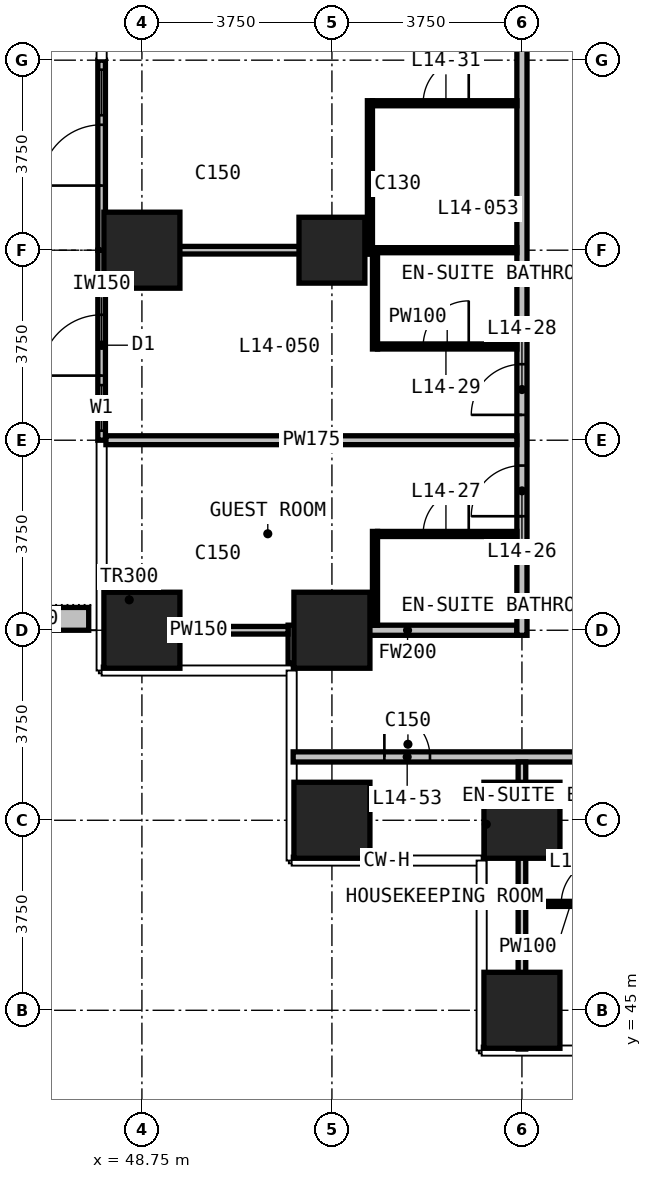
"""IFC4 building model, lengths in metres.
Left out: names, types, materials, properties, quantities, classifications, styles, units other than length and angle.
Written with IfcOpenShell. Run it as: python <this file> out.ifc"""

import sys

from ifc_helpers import new_model, si_unit, direction, frame, frame_2d, origin, origin_2d, place, context, subcontext, project, spatial, rectangle, extrude, element, fill, save


model = new_model("IFC4")
c1 = context("Model", 3, precision=1e-05, world=origin(), true_north=direction((0.0, 1.0)))
c2 = subcontext(c1, "Body", "Model", "MODEL_VIEW")
j1 = project(units=[si_unit("LENGTHUNIT", "METRE"), si_unit("PLANEANGLEUNIT", "RADIAN")], contexts=[c1])
p1 = place(None, origin())
s1 = spatial("IfcSite", under=j1, at=p1, CompositionType="ELEMENT")
p2 = place(p1, origin())
s2 = spatial("IfcBuilding", under=s1, at=p2, CompositionType="ELEMENT")
p3 = place(p2, frame((0.0, 0.0, 65.9)))
s3 = spatial("IfcBuildingStorey", under=s2, at=p3, CompositionType="ELEMENT", Elevation=65.9)
for number, where, z_axis, x_axis in (
    (1, (48.75, 52.5, 0.0), (0.0, 0.0, 1.0), (1.0, 0.0, 0.0)),
    (2, (48.75, 60.0, 0.0), (0.0, 0.0, 1.0), (1.0, 0.0, 0.0)),
    (3, (52.5, 48.75, 0.0), (0.0, 0.0, 1.0), (1.0, 0.0, 0.0)),
    (4, (52.5, 52.5, 0.0), (0.0, 0.0, 1.0), (1.0, 0.0, 0.0)),
):
    element("IfcColumn", number, at=place(p3, frame(where, z_axis=z_axis, x_axis=x_axis)), inside=s3, PredefinedType="COLUMN", context=c2, shape_type="SweptSolid", body=[
        extrude(rectangle(XDim=1.5, YDim=1.5, at=origin_2d()), origin(), (0.0, 0.0, 1.0), 3.3),
    ])
p4 = place(p3, frame((52.5, 60.0, 0.0), z_axis=(0.0, 0.0, 1.0), x_axis=(1.0, 0.0, 0.0)))
e5 = element("IfcColumn", 5, at=p4, inside=s3, PredefinedType="COLUMN", context=c2, shape_type="SweptSolid", body=[
    extrude(rectangle(XDim=1.3, YDim=1.3, at=origin_2d()), origin(), (0.0, 0.0, 1.0), 3.3),
])
for number, where, z_axis, x_axis in (
    (6, (56.25, 45.0, 0.0), (0.0, 0.0, 1.0), (1.0, 0.0, 0.0)),
    (7, (56.25, 48.75, 0.0), (0.0, 0.0, 1.0), (1.0, 0.0, 0.0)),
):
    element("IfcColumn", number, at=place(p3, frame(where, z_axis=z_axis, x_axis=x_axis)), inside=s3, PredefinedType="COLUMN", context=c2, shape_type="SweptSolid", body=[
        extrude(rectangle(XDim=1.5, YDim=1.5, at=origin_2d()), origin(), (0.0, 0.0, 1.0), 3.3),
    ])
p5 = place(p3, frame((47.955, 56.25, 0.0), z_axis=(0.0, 0.0, 1.0), x_axis=(0.0, 1.0, 0.0)))
e8 = element("IfcWall", 8, at=p5, inside=s3, PredefinedType="SOLIDWALL", context=c2, shape_type="SweptSolid", body=[
    extrude(rectangle(XDim=3.75, YDim=0.15, at=frame_2d((1.875, 0.0))), origin(), (0.0, 0.0, 1.0), 3.0),
])
p6 = place(p5, frame((0.188, 0.0, 0.1)))
e9 = element("IfcOpeningElement", 9, at=p6, cuts=e8, PredefinedType="OPENING", context=c2, shape_type="SweptSolid", body=[
    extrude(rectangle(XDim=0.9, YDim=2.4, at=frame_2d((0.45, 1.2))), frame((0.0, 0.085, 0.0), z_axis=(0.0, -1.0, 0.0), x_axis=(1.0, 0.0, 0.0)), (0.0, 0.0, 1.0), 0.17),
])
p7 = place(p5, frame((1.275, 0.0, 0.0)))
e10 = element("IfcOpeningElement", 10, at=p7, cuts=e8, PredefinedType="OPENING", context=c2, shape_type="SweptSolid", body=[
    extrude(rectangle(XDim=1.2, YDim=2.4, at=frame_2d((0.6, 1.2))), frame((0.0, 0.085, 0.0), z_axis=(0.0, -1.0, 0.0), x_axis=(1.0, 0.0, 0.0)), (0.0, 0.0, 1.0), 0.17),
])
p8 = place(p3, frame((47.955, 60.0, 0.0), z_axis=(0.0, 0.0, 1.0), x_axis=(0.0, 1.0, 0.0)))
e11 = element("IfcWall", 11, at=p8, inside=s3, PredefinedType="SOLIDWALL", context=c2, shape_type="SweptSolid", body=[
    extrude(rectangle(XDim=3.75, YDim=0.15, at=frame_2d((1.875, 0.0))), origin(), (0.0, 0.0, 1.0), 3.0),
])
p9 = place(p8, frame((1.275, 0.0, 0.0)))
e12 = element("IfcOpeningElement", 12, at=p9, cuts=e11, PredefinedType="OPENING", context=c2, shape_type="SweptSolid", body=[
    extrude(rectangle(XDim=1.2, YDim=2.4, at=frame_2d((0.6, 1.2))), frame((0.0, 0.085, 0.0), z_axis=(0.0, -1.0, 0.0), x_axis=(1.0, 0.0, 0.0)), (0.0, 0.0, 1.0), 0.17),
])
p10 = place(p8, frame((2.663, 0.0, 0.1)))
e13 = element("IfcOpeningElement", 13, at=p10, cuts=e11, PredefinedType="OPENING", context=c2, shape_type="SweptSolid", body=[
    extrude(rectangle(XDim=0.9, YDim=2.4, at=frame_2d((0.45, 1.2))), frame((0.0, 0.085, 0.0), z_axis=(0.0, -1.0, 0.0), x_axis=(1.0, 0.0, 0.0)), (0.0, 0.0, 1.0), 0.17),
])
p11 = place(p3, frame((47.7, 52.725, 0.0), z_axis=(0.0, 0.0, 1.0), x_axis=(-1.0, 0.0, 0.0)))
e14 = element("IfcWall", 14, at=p11, inside=s3, PredefinedType="USERDEFINED", context=c2, shape_type="SweptSolid", body=[
    extrude(rectangle(XDim=2.35, YDim=0.45, at=frame_2d((1.175, 0.0))), origin(), (0.0, 0.0, 1.0), 1.1),
])
p12 = place(p3, frame((51.735, 50.0, 0.0), z_axis=(0.0, 0.0, 1.0), x_axis=(1.0, 0.0, 0.0)))
e15 = element("IfcWall", 15, at=p12, inside=s3, PredefinedType="PARTITIONING", context=c2, shape_type="SweptSolid", body=[
    extrude(rectangle(XDim=46.53, YDim=0.2, at=frame_2d((23.265, 0.0))), origin(), (0.0, 0.0, 1.0), 3.0),
])
p13 = place(p12, frame((6.765, 0.0, 0.0)))
e16 = element("IfcOpeningElement", 16, at=p13, cuts=e15, PredefinedType="OPENING", context=c2, shape_type="SweptSolid", body=[
    extrude(rectangle(XDim=1.0, YDim=2.2, at=frame_2d((0.5, 1.1))), frame((0.0, 0.11, 0.0), z_axis=(0.0, -1.0, 0.0), x_axis=(1.0, 0.0, 0.0)), (0.0, 0.0, 1.0), 0.22),
])
p14 = place(p12, frame((10.515, 0.0, 0.0)))
e17 = element("IfcOpeningElement", 17, at=p14, cuts=e15, PredefinedType="OPENING", context=c2, shape_type="SweptSolid", body=[
    extrude(rectangle(XDim=1.0, YDim=2.2, at=frame_2d((0.5, 1.1))), frame((0.0, 0.11, 0.0), z_axis=(0.0, -1.0, 0.0), x_axis=(1.0, 0.0, 0.0)), (0.0, 0.0, 1.0), 0.22),
])
p15 = place(p12, frame((12.515, 0.0, 0.0)))
e18 = element("IfcOpeningElement", 18, at=p15, cuts=e15, PredefinedType="OPENING", context=c2, shape_type="SweptSolid", body=[
    extrude(rectangle(XDim=1.0, YDim=2.2, at=frame_2d((0.5, 1.1))), frame((0.0, 0.11, 0.0), z_axis=(0.0, -1.0, 0.0), x_axis=(1.0, 0.0, 0.0)), (0.0, 0.0, 1.0), 0.22),
])
p16 = place(p12, frame((18.015, 0.0, 0.0)))
e19 = element("IfcOpeningElement", 19, at=p16, cuts=e15, PredefinedType="OPENING", context=c2, shape_type="SweptSolid", body=[
    extrude(rectangle(XDim=1.0, YDim=2.2, at=frame_2d((0.5, 1.1))), frame((0.0, 0.11, 0.0), z_axis=(0.0, -1.0, 0.0), x_axis=(1.0, 0.0, 0.0)), (0.0, 0.0, 1.0), 0.22),
])
p17 = place(p12, frame((20.015, 0.0, 0.0)))
e20 = element("IfcOpeningElement", 20, at=p17, cuts=e15, PredefinedType="OPENING", context=c2, shape_type="SweptSolid", body=[
    extrude(rectangle(XDim=1.0, YDim=2.2, at=frame_2d((0.5, 1.1))), frame((0.0, 0.11, 0.0), z_axis=(0.0, -1.0, 0.0), x_axis=(1.0, 0.0, 0.0)), (0.0, 0.0, 1.0), 0.22),
])
p18 = place(p12, frame((25.515, 0.0, 0.0)))
e21 = element("IfcOpeningElement", 21, at=p18, cuts=e15, PredefinedType="OPENING", context=c2, shape_type="SweptSolid", body=[
    extrude(rectangle(XDim=1.0, YDim=2.2, at=frame_2d((0.5, 1.1))), frame((0.0, 0.11, 0.0), z_axis=(0.0, -1.0, 0.0), x_axis=(1.0, 0.0, 0.0)), (0.0, 0.0, 1.0), 0.22),
])
p19 = place(p12, frame((27.515, 0.0, 0.0)))
e22 = element("IfcOpeningElement", 22, at=p19, cuts=e15, PredefinedType="OPENING", context=c2, shape_type="SweptSolid", body=[
    extrude(rectangle(XDim=1.0, YDim=2.2, at=frame_2d((0.5, 1.1))), frame((0.0, 0.11, 0.0), z_axis=(0.0, -1.0, 0.0), x_axis=(1.0, 0.0, 0.0)), (0.0, 0.0, 1.0), 0.22),
])
p20 = place(p12, frame((33.015, 0.0, 0.0)))
e23 = element("IfcOpeningElement", 23, at=p20, cuts=e15, PredefinedType="OPENING", context=c2, shape_type="SweptSolid", body=[
    extrude(rectangle(XDim=1.0, YDim=2.2, at=frame_2d((0.5, 1.1))), frame((0.0, 0.11, 0.0), z_axis=(0.0, -1.0, 0.0), x_axis=(1.0, 0.0, 0.0)), (0.0, 0.0, 1.0), 0.22),
])
p21 = place(p12, frame((35.015, 0.0, 0.0)))
e24 = element("IfcOpeningElement", 24, at=p21, cuts=e15, PredefinedType="OPENING", context=c2, shape_type="SweptSolid", body=[
    extrude(rectangle(XDim=1.0, YDim=2.2, at=frame_2d((0.5, 1.1))), frame((0.0, 0.11, 0.0), z_axis=(0.0, -1.0, 0.0), x_axis=(1.0, 0.0, 0.0)), (0.0, 0.0, 1.0), 0.22),
])
p22 = place(p12, frame((38.765, 0.0, 0.0)))
e25 = element("IfcOpeningElement", 25, at=p22, cuts=e15, PredefinedType="OPENING", context=c2, shape_type="SweptSolid", body=[
    extrude(rectangle(XDim=1.0, YDim=2.2, at=frame_2d((0.5, 1.1))), frame((0.0, 0.11, 0.0), z_axis=(0.0, -1.0, 0.0), x_axis=(1.0, 0.0, 0.0)), (0.0, 0.0, 1.0), 0.22),
])
p23 = place(p12, frame((1.8, 0.0, 0.0)))
e26 = element("IfcOpeningElement", 26, at=p23, cuts=e15, PredefinedType="OPENING", context=c2, shape_type="SweptSolid", body=[
    extrude(rectangle(XDim=0.9, YDim=2.2, at=frame_2d((0.45, 1.1))), frame((0.0, 0.11, 0.0), z_axis=(0.0, -1.0, 0.0), x_axis=(1.0, 0.0, 0.0)), (0.0, 0.0, 1.0), 0.22),
])
p24 = place(p12, frame((43.815, 0.0, 0.0)))
e27 = element("IfcOpeningElement", 27, at=p24, cuts=e15, PredefinedType="OPENING", context=c2, shape_type="SweptSolid", body=[
    extrude(rectangle(XDim=0.9, YDim=2.2, at=frame_2d((0.45, 1.1))), frame((0.0, 0.11, 0.0), z_axis=(0.0, -1.0, 0.0), x_axis=(1.0, 0.0, 0.0)), (0.0, 0.0, 1.0), 0.22),
])
p25 = place(p3, frame((51.835, 52.5, 0.0), z_axis=(0.0, 0.0, 1.0), x_axis=(1.0, 0.0, 0.0)))
e28 = element("IfcWall", 28, at=p25, inside=s3, PredefinedType="PARTITIONING", context=c2, shape_type="SweptSolid", body=[
    extrude(rectangle(XDim=4.315, YDim=0.2, at=frame_2d((2.157, 0.0))), origin(), (0.0, 0.0, 1.0), 3.0),
])
p26 = place(p3, frame((51.735, 51.855, 0.0), z_axis=(0.0, 0.0, 1.0), x_axis=(0.0, 1.0, 0.0)))
e29 = element("IfcWall", 29, at=p26, inside=s3, PredefinedType="PARTITIONING", context=c2, shape_type="SweptSolid", body=[
    extrude(rectangle(XDim=0.745, YDim=0.2, at=frame_2d((0.373, 0.0))), origin(), (0.0, 0.0, 1.0), 3.0),
])
p27 = place(p3, frame((56.25, 52.4, 0.0), z_axis=(0.0, 0.0, 1.0), x_axis=(0.0, 1.0, 0.0)))
e30 = element("IfcWall", 30, at=p27, inside=s3, PredefinedType="PARTITIONING", context=c2, shape_type="SweptSolid", body=[
    extrude(rectangle(XDim=38.31, YDim=0.2, at=frame_2d((19.155, 0.0))), origin(), (0.0, 0.0, 1.0), 3.0),
])
p28 = place(p27, frame((2.35, 0.0, 0.0)))
e31 = element("IfcOpeningElement", 31, at=p28, cuts=e30, PredefinedType="OPENING", context=c2, shape_type="SweptSolid", body=[
    extrude(rectangle(XDim=1.0, YDim=2.2, at=frame_2d((0.5, 1.1))), frame((0.0, 0.11, 0.0), z_axis=(0.0, -1.0, 0.0), x_axis=(1.0, 0.0, 0.0)), (0.0, 0.0, 1.0), 0.22),
])
p29 = place(p27, frame((4.35, 0.0, 0.0)))
e32 = element("IfcOpeningElement", 32, at=p29, cuts=e30, PredefinedType="OPENING", context=c2, shape_type="SweptSolid", body=[
    extrude(rectangle(XDim=1.0, YDim=2.2, at=frame_2d((0.5, 1.1))), frame((0.0, 0.11, 0.0), z_axis=(0.0, -1.0, 0.0), x_axis=(1.0, 0.0, 0.0)), (0.0, 0.0, 1.0), 0.22),
])
p30 = place(p27, frame((13.0, 0.0, 0.0)))
e33 = element("IfcOpeningElement", 33, at=p30, cuts=e30, PredefinedType="OPENING", context=c2, shape_type="SweptSolid", body=[
    extrude(rectangle(XDim=1.0, YDim=2.2, at=frame_2d((0.5, 1.1))), frame((0.0, 0.11, 0.0), z_axis=(0.0, -1.0, 0.0), x_axis=(1.0, 0.0, 0.0)), (0.0, 0.0, 1.0), 0.22),
])
p31 = place(p27, frame((15.6, 0.0, 0.0)))
e34 = element("IfcOpeningElement", 34, at=p31, cuts=e30, PredefinedType="OPENING", context=c2, shape_type="SweptSolid", body=[
    extrude(rectangle(XDim=1.0, YDim=2.2, at=frame_2d((0.5, 1.1))), frame((0.0, 0.11, 0.0), z_axis=(0.0, -1.0, 0.0), x_axis=(1.0, 0.0, 0.0)), (0.0, 0.0, 1.0), 0.22),
])
p32 = place(p27, frame((21.1, 0.0, 0.0)))
e35 = element("IfcOpeningElement", 35, at=p32, cuts=e30, PredefinedType="OPENING", context=c2, shape_type="SweptSolid", body=[
    extrude(rectangle(XDim=1.0, YDim=2.2, at=frame_2d((0.5, 1.1))), frame((0.0, 0.11, 0.0), z_axis=(0.0, -1.0, 0.0), x_axis=(1.0, 0.0, 0.0)), (0.0, 0.0, 1.0), 0.22),
])
p33 = place(p27, frame((23.7, 0.0, 0.0)))
e36 = element("IfcOpeningElement", 36, at=p33, cuts=e30, PredefinedType="OPENING", context=c2, shape_type="SweptSolid", body=[
    extrude(rectangle(XDim=1.0, YDim=2.2, at=frame_2d((0.5, 1.1))), frame((0.0, 0.11, 0.0), z_axis=(0.0, -1.0, 0.0), x_axis=(1.0, 0.0, 0.0)), (0.0, 0.0, 1.0), 0.22),
])
p34 = place(p27, frame((31.55, 0.0, 0.0)))
e37 = element("IfcOpeningElement", 37, at=p34, cuts=e30, PredefinedType="OPENING", context=c2, shape_type="SweptSolid", body=[
    extrude(rectangle(XDim=0.9, YDim=2.2, at=frame_2d((0.45, 1.1))), frame((0.0, 0.11, 0.0), z_axis=(0.0, -1.0, 0.0), x_axis=(1.0, 0.0, 0.0)), (0.0, 0.0, 1.0), 0.22),
])
p35 = place(p27, frame((35.65, 0.0, 0.0)))
e38 = element("IfcOpeningElement", 38, at=p35, cuts=e30, PredefinedType="OPENING", context=c2, shape_type="SweptSolid", body=[
    extrude(rectangle(XDim=0.9, YDim=2.2, at=frame_2d((0.45, 1.1))), frame((0.0, 0.11, 0.0), z_axis=(0.0, -1.0, 0.0), x_axis=(1.0, 0.0, 0.0)), (0.0, 0.0, 1.0), 0.22),
])
p36 = place(p3, frame((48.04, 56.25, 0.0), z_axis=(0.0, 0.0, 1.0), x_axis=(1.0, 0.0, 0.0)))
e39 = element("IfcWall", 39, at=p36, inside=s3, PredefinedType="PARTITIONING", context=c2, shape_type="SweptSolid", body=[
    extrude(rectangle(XDim=8.11, YDim=0.175, at=frame_2d((4.055, 0.0))), origin(), (0.0, 0.0, 1.0), 3.0),
])
p37 = place(p3, frame((48.105, 52.5, 0.0), z_axis=(0.0, 0.0, 1.0), x_axis=(1.0, 0.0, 0.0)))
e40 = element("IfcWall", 40, at=p37, inside=s3, PredefinedType="PARTITIONING", context=c2, shape_type="SweptSolid", body=[
    extrude(rectangle(XDim=3.53, YDim=0.15, at=frame_2d((1.765, 0.0))), origin(), (0.0, 0.0, 1.0), 3.0),
])
p38 = place(p3, frame((48.04, 60.0, 0.0), z_axis=(0.0, 0.0, 1.0), x_axis=(1.0, 0.0, 0.0)))
e41 = element("IfcWall", 41, at=p38, inside=s3, PredefinedType="PARTITIONING", context=c2, shape_type="SweptSolid", body=[
    extrude(rectangle(XDim=5.16, YDim=0.15, at=frame_2d((2.58, 0.0))), origin(), (0.0, 0.0, 1.0), 3.0),
])
p39 = place(p3, frame((56.25, 44.235, 0.0), z_axis=(0.0, 0.0, 1.0), x_axis=(0.0, 1.0, 0.0)))
e42 = element("IfcWall", 42, at=p39, inside=s3, PredefinedType="PARTITIONING", context=c2, shape_type="SweptSolid", body=[
    extrude(rectangle(XDim=5.665, YDim=0.15, at=frame_2d((2.833, 0.0))), origin(), (0.0, 0.0, 1.0), 3.0),
])
p40 = place(p3, frame((56.325, 47.1, 0.0), z_axis=(0.0, 0.0, 1.0), x_axis=(1.0, 0.0, 0.0)))
e43 = element("IfcWall", 43, at=p40, inside=s3, PredefinedType="PARTITIONING", context=c2, shape_type="SweptSolid", body=[
    extrude(rectangle(XDim=1.775, YDim=0.1, at=frame_2d((0.888, 0.0))), origin(), (0.0, 0.0, 1.0), 3.0),
])
p41 = place(p40, frame((0.7, 0.0, 0.0)))
e44 = element("IfcOpeningElement", 44, at=p41, cuts=e43, PredefinedType="OPENING", context=c2, shape_type="SweptSolid", body=[
    extrude(rectangle(XDim=0.9, YDim=2.2, at=frame_2d((0.45, 1.1))), frame((0.0, 0.06, 0.0), z_axis=(0.0, -1.0, 0.0), x_axis=(1.0, 0.0, 0.0)), (0.0, 0.0, 1.0), 0.12),
])
p42 = place(p3, frame((53.4, 54.4, 0.0), z_axis=(0.0, 0.0, 1.0), x_axis=(1.0, 0.0, 0.0)))
e45 = element("IfcWall", 45, at=p42, inside=s3, PredefinedType="PARTITIONING", context=c2, shape_type="SweptSolid", body=[
    extrude(rectangle(XDim=2.75, YDim=0.1, at=frame_2d((1.375, 0.0))), origin(), (0.0, 0.0, 1.0), 3.0),
])
p43 = place(p42, frame((0.9, 0.0, 0.0)))
e46 = element("IfcOpeningElement", 46, at=p43, cuts=e45, PredefinedType="OPENING", context=c2, shape_type="SweptSolid", body=[
    extrude(rectangle(XDim=0.9, YDim=2.2, at=frame_2d((0.45, 1.1))), frame((0.0, 0.06, 0.0), z_axis=(0.0, -1.0, 0.0), x_axis=(1.0, 0.0, 0.0)), (0.0, 0.0, 1.0), 0.12),
])
p44 = place(p3, frame((53.4, 58.1, 0.0), z_axis=(0.0, 0.0, 1.0), x_axis=(1.0, 0.0, 0.0)))
e47 = element("IfcWall", 47, at=p44, inside=s3, PredefinedType="PARTITIONING", context=c2, shape_type="SweptSolid", body=[
    extrude(rectangle(XDim=2.75, YDim=0.1, at=frame_2d((1.375, 0.0))), origin(), (0.0, 0.0, 1.0), 3.0),
])
p45 = place(p44, frame((0.9, 0.0, 0.0)))
e48 = element("IfcOpeningElement", 48, at=p45, cuts=e47, PredefinedType="OPENING", context=c2, shape_type="SweptSolid", body=[
    extrude(rectangle(XDim=0.9, YDim=2.2, at=frame_2d((0.45, 1.1))), frame((0.0, 0.06, 0.0), z_axis=(0.0, -1.0, 0.0), x_axis=(1.0, 0.0, 0.0)), (0.0, 0.0, 1.0), 0.12),
])
p46 = place(p3, frame((53.4, 60.0, 0.0), z_axis=(0.0, 0.0, 1.0), x_axis=(1.0, 0.0, 0.0)))
e49 = element("IfcWall", 49, at=p46, inside=s3, PredefinedType="PARTITIONING", context=c2, shape_type="SweptSolid", body=[
    extrude(rectangle(XDim=2.75, YDim=0.1, at=frame_2d((1.375, 0.0))), origin(), (0.0, 0.0, 1.0), 3.0),
])
p47 = place(p3, frame((53.3, 62.9, 0.0), z_axis=(0.0, 0.0, 1.0), x_axis=(1.0, 0.0, 0.0)))
e50 = element("IfcWall", 50, at=p47, inside=s3, PredefinedType="PARTITIONING", context=c2, shape_type="SweptSolid", body=[
    extrude(rectangle(XDim=2.85, YDim=0.1, at=frame_2d((1.425, 0.0))), origin(), (0.0, 0.0, 1.0), 3.0),
])
p48 = place(p47, frame((1.0, 0.0, 0.0)))
e51 = element("IfcOpeningElement", 51, at=p48, cuts=e50, PredefinedType="OPENING", context=c2, shape_type="SweptSolid", body=[
    extrude(rectangle(XDim=0.9, YDim=2.2, at=frame_2d((0.45, 1.1))), frame((0.0, 0.06, 0.0), z_axis=(0.0, -1.0, 0.0), x_axis=(1.0, 0.0, 0.0)), (0.0, 0.0, 1.0), 0.12),
])
p49 = place(p3, frame((53.25, 59.925, 0.0), z_axis=(0.0, 0.0, 1.0), x_axis=(0.0, 1.0, 0.0)))
e52 = element("IfcWall", 52, at=p49, inside=s3, PredefinedType="PARTITIONING", context=c2, shape_type="SweptSolid", body=[
    extrude(rectangle(XDim=3.025, YDim=0.1, at=frame_2d((1.512, 0.0))), origin(), (0.0, 0.0, 1.0), 3.0),
])
p50 = place(p3, frame((53.35, 52.6, 0.0), z_axis=(0.0, 0.0, 1.0), x_axis=(0.0, 1.0, 0.0)))
e53 = element("IfcWall", 53, at=p50, inside=s3, PredefinedType="PARTITIONING", context=c2, shape_type="SweptSolid", body=[
    extrude(rectangle(XDim=1.85, YDim=0.1, at=frame_2d((0.925, 0.0))), origin(), (0.0, 0.0, 1.0), 3.0),
])
p51 = place(p3, frame((53.35, 58.05, 0.0), z_axis=(0.0, 0.0, 1.0), x_axis=(0.0, 1.0, 0.0)))
e54 = element("IfcWall", 54, at=p51, inside=s3, PredefinedType="PARTITIONING", context=c2, shape_type="SweptSolid", body=[
    extrude(rectangle(XDim=2.0, YDim=0.1, at=frame_2d((1.0, 0.0))), origin(), (0.0, 0.0, 1.0), 3.0),
])
p52 = place(p6, origin())
e55 = element("IfcWindow", 55, at=p52, inside=s3, PartitioningType="SINGLE_PANEL", PredefinedType="WINDOW", context=c2, shape_type="SweptSolid", body=[
    extrude(rectangle(XDim=0.9, YDim=2.4, at=frame_2d((0.45, 1.2))), frame((0.0, 0.03, 0.0), z_axis=(0.0, -1.0, 0.0), x_axis=(1.0, 0.0, 0.0)), (0.0, 0.0, 1.0), 0.06),
])
fill(e9, e55)
p53 = place(p7, origin())
e56 = element("IfcDoor", 56, at=p53, inside=s3, OperationType="SINGLE_SWING_LEFT", PredefinedType="DOOR", context=c2, shape_type="SweptSolid", body=[
    extrude(rectangle(XDim=1.2, YDim=2.4, at=frame_2d((0.6, 1.2))), frame((0.0, 0.025, 0.0), z_axis=(0.0, -1.0, 0.0), x_axis=(1.0, 0.0, 0.0)), (0.0, 0.0, 1.0), 0.05),
])
fill(e10, e56)
p54 = place(p9, origin())
e57 = element("IfcDoor", 57, at=p54, inside=s3, OperationType="SINGLE_SWING_LEFT", PredefinedType="DOOR", context=c2, shape_type="SweptSolid", body=[
    extrude(rectangle(XDim=1.2, YDim=2.4, at=frame_2d((0.6, 1.2))), frame((0.0, 0.025, 0.0), z_axis=(0.0, -1.0, 0.0), x_axis=(1.0, 0.0, 0.0)), (0.0, 0.0, 1.0), 0.05),
])
fill(e12, e57)
p55 = place(p10, origin())
e58 = element("IfcWindow", 58, at=p55, inside=s3, PartitioningType="SINGLE_PANEL", PredefinedType="WINDOW", context=c2, shape_type="SweptSolid", body=[
    extrude(rectangle(XDim=0.9, YDim=2.4, at=frame_2d((0.45, 1.2))), frame((0.0, 0.03, 0.0), z_axis=(0.0, -1.0, 0.0), x_axis=(1.0, 0.0, 0.0)), (0.0, 0.0, 1.0), 0.06),
])
fill(e13, e58)
p56 = place(p41, origin())
e59 = element("IfcDoor", 59, at=p56, inside=s3, OperationType="SINGLE_SWING_RIGHT", PredefinedType="DOOR", context=c2, shape_type="SweptSolid", body=[
    extrude(rectangle(XDim=0.9, YDim=2.2, at=frame_2d((0.45, 1.1))), frame((0.0, 0.025, 0.0), z_axis=(0.0, -1.0, 0.0), x_axis=(1.0, 0.0, 0.0)), (0.0, 0.0, 1.0), 0.05),
])
fill(e44, e59)
p57 = place(p28, origin())
e60 = element("IfcDoor", 60, at=p57, inside=s3, OperationType="SINGLE_SWING_LEFT", PredefinedType="DOOR", context=c2, shape_type="SweptSolid", body=[
    extrude(rectangle(XDim=1.0, YDim=2.2, at=frame_2d((0.5, 1.1))), frame((0.0, 0.025, 0.0), z_axis=(0.0, -1.0, 0.0), x_axis=(1.0, 0.0, 0.0)), (0.0, 0.0, 1.0), 0.05),
])
fill(e31, e60)
p58 = place(p43, origin())
e61 = element("IfcDoor", 61, at=p58, inside=s3, OperationType="SINGLE_SWING_RIGHT", PredefinedType="DOOR", context=c2, shape_type="SweptSolid", body=[
    extrude(rectangle(XDim=0.9, YDim=2.2, at=frame_2d((0.45, 1.1))), frame((0.0, 0.025, 0.0), z_axis=(0.0, -1.0, 0.0), x_axis=(1.0, 0.0, 0.0)), (0.0, 0.0, 1.0), 0.05),
])
fill(e46, e61)
p59 = place(p29, origin())
e62 = element("IfcDoor", 62, at=p59, inside=s3, OperationType="SINGLE_SWING_LEFT", PredefinedType="DOOR", context=c2, shape_type="SweptSolid", body=[
    extrude(rectangle(XDim=1.0, YDim=2.2, at=frame_2d((0.5, 1.1))), frame((0.0, 0.025, 0.0), z_axis=(0.0, -1.0, 0.0), x_axis=(1.0, 0.0, 0.0)), (0.0, 0.0, 1.0), 0.05),
])
fill(e32, e62)
p60 = place(p45, origin())
e63 = element("IfcDoor", 63, at=p60, inside=s3, OperationType="SINGLE_SWING_RIGHT", PredefinedType="DOOR", context=c2, shape_type="SweptSolid", body=[
    extrude(rectangle(XDim=0.9, YDim=2.2, at=frame_2d((0.45, 1.1))), frame((0.0, 0.025, 0.0), z_axis=(0.0, -1.0, 0.0), x_axis=(1.0, 0.0, 0.0)), (0.0, 0.0, 1.0), 0.05),
])
fill(e48, e63)
p61 = place(p48, origin())
e64 = element("IfcDoor", 64, at=p61, inside=s3, OperationType="SINGLE_SWING_RIGHT", PredefinedType="DOOR", context=c2, shape_type="SweptSolid", body=[
    extrude(rectangle(XDim=0.9, YDim=2.2, at=frame_2d((0.45, 1.1))), frame((0.0, 0.025, 0.0), z_axis=(0.0, -1.0, 0.0), x_axis=(1.0, 0.0, 0.0)), (0.0, 0.0, 1.0), 0.05),
])
fill(e51, e64)
p62 = place(p23, origin())
e65 = element("IfcDoor", 65, at=p62, inside=s3, OperationType="SINGLE_SWING_RIGHT", PredefinedType="DOOR", context=c2, shape_type="SweptSolid", body=[
    extrude(rectangle(XDim=0.9, YDim=2.2, at=frame_2d((0.45, 1.1))), frame((0.0, 0.025, 0.0), z_axis=(0.0, -1.0, 0.0), x_axis=(1.0, 0.0, 0.0)), (0.0, 0.0, 1.0), 0.05),
])
fill(e26, e65)
save(model, sys.argv[1])
